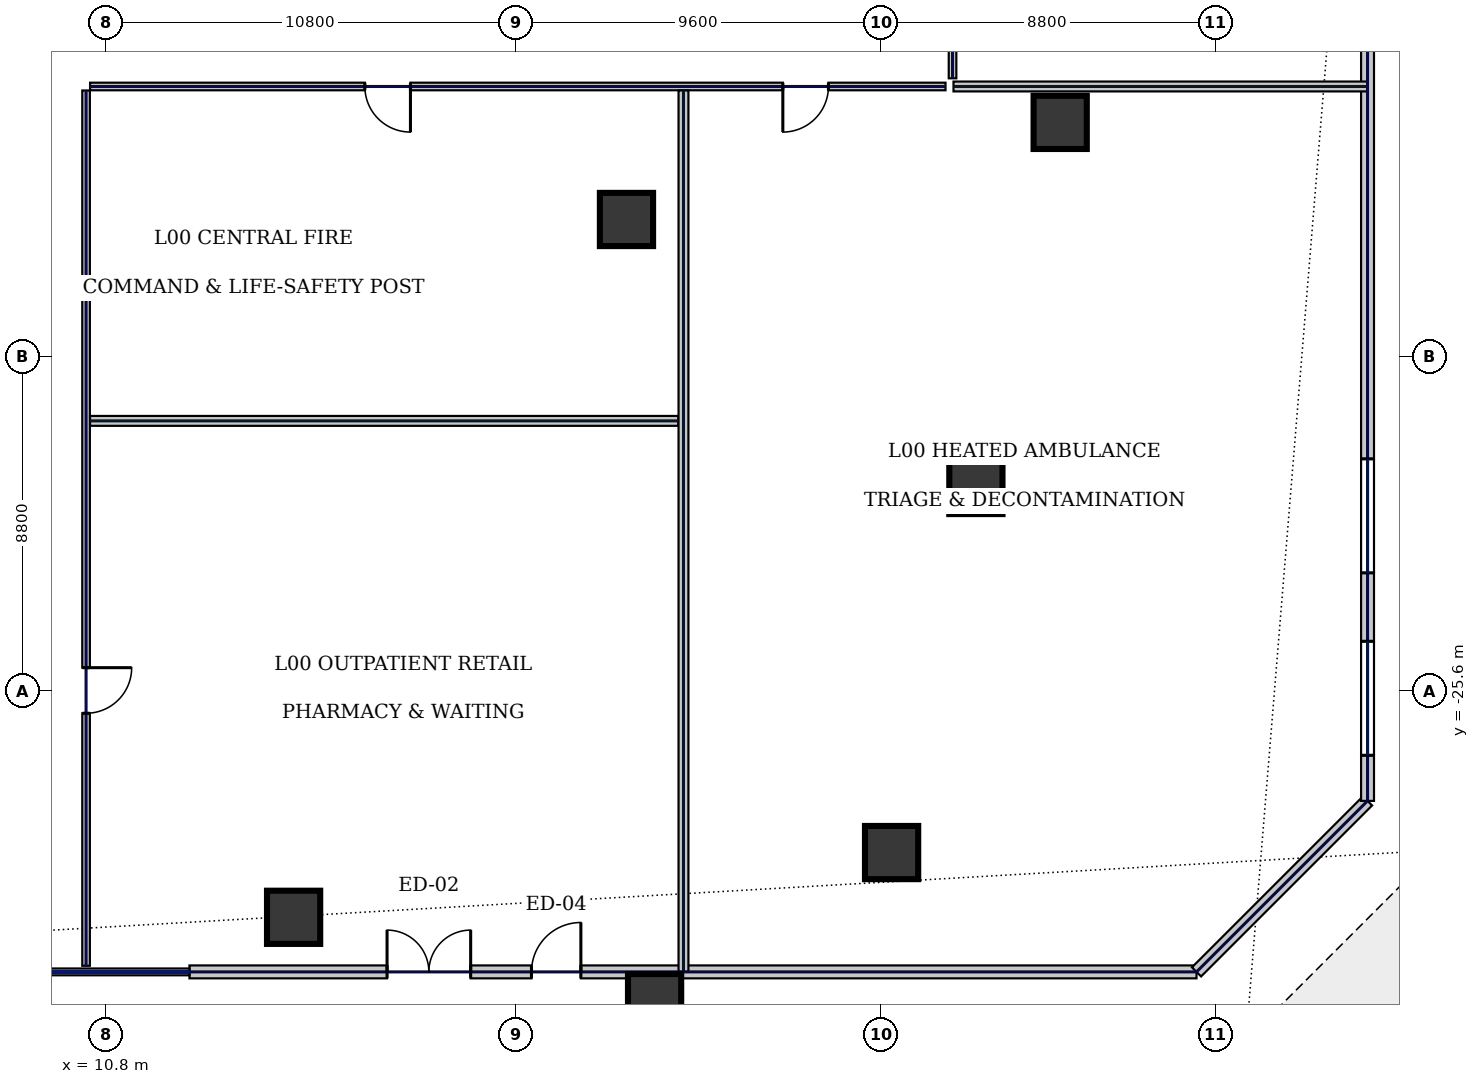
"""IFC4 building model, lengths in metres.
Left out: names, types, materials, properties, quantities, classifications, styles, units other than length and angle.
Written with IfcOpenShell. Run it as: python <this file> out.ifc"""

import sys

from ifc_helpers import new_model, si_unit, direction, frame, frame_2d, origin, origin_2d, place, context, subcontext, project, spatial, rectangle, hollow_circle, extrude, element, fill, save


model = new_model("IFC4")
c1 = context("Model", 3, precision=1e-05, world=origin(), true_north=direction((0.0, 1.0)))
c2 = subcontext(c1, "Body", "Model", "MODEL_VIEW")
j1 = project(units=[si_unit("LENGTHUNIT", "METRE"), si_unit("PLANEANGLEUNIT", "RADIAN")], contexts=[c1])
p1 = place(None, origin())
s1 = spatial("IfcSite", under=j1, at=p1, CompositionType="ELEMENT")
p2 = place(p1, origin())
s2 = spatial("IfcBuilding", under=s1, at=p2, CompositionType="ELEMENT")
p3 = place(p2, origin())
s3 = spatial("IfcBuildingStorey", under=s2, at=p3, CompositionType="ELEMENT", Elevation=0.0)
for number, where, z_axis, x_axis in (
    (1, (24.5, -13.2, 0.0), (0.0, 0.0, 1.0), (1.0, 0.0, 0.0)),
    (2, (15.741, -31.564, 0.0), (0.0, 0.0, 1.0), (1.0, 0.0, 0.0)),
    (3, (25.24, -33.757, 0.0), (0.0, 0.0, 1.0), (1.0, 0.0, 0.0)),
    (4, (31.476, -29.86, 0.0), (0.0, 0.0, 1.0), (1.0, 0.0, 0.0)),
    (5, (33.694, -20.252, 0.0), (0.0, 0.0, 1.0), (1.0, 0.0, 0.0)),
    (6, (35.912, -10.645, 0.0), (0.0, 0.0, 1.0), (1.0, 0.0, 0.0)),
):
    element("IfcColumn", number, at=place(p3, frame(where, z_axis=z_axis, x_axis=x_axis)), inside=s3, PredefinedType="COLUMN", context=c2, shape_type="SweptSolid", body=[
        extrude(hollow_circle(Radius=0.7, WallThickness=0.05, at=origin_2d()), origin(), (0.0, 0.0, 1.0), 8.1),
    ])
p4 = place(p3, frame((13.0, -33.0, 0.0), z_axis=(0.0, 0.0, 1.0), x_axis=(1.0, 0.0, 0.0)))
e7 = element("IfcWall", 7, at=p4, inside=s3, PredefinedType="STANDARD", context=c2, shape_type="SweptSolid", body=[
    extrude(rectangle(XDim=26.5, YDim=0.34, at=frame_2d((13.25, 0.0))), origin(), (0.0, 0.0, 1.0), 7.095),
])
p5 = place(p4, frame((5.2, 0.0, 0.0)))
e8 = element("IfcOpeningElement", 8, at=p5, cuts=e7, PredefinedType="OPENING", context=c2, shape_type="SweptSolid", body=[
    extrude(rectangle(XDim=2.2, YDim=2.5, at=frame_2d((1.1, 1.25))), frame((0.0, 0.18, 0.0), z_axis=(0.0, -1.0, 0.0), x_axis=(1.0, 0.0, 0.0)), (0.0, 0.0, 1.0), 0.36),
])
p6 = place(p4, frame((9.0, 0.0, 0.0)))
e9 = element("IfcOpeningElement", 9, at=p6, cuts=e7, PredefinedType="OPENING", context=c2, shape_type="SweptSolid", body=[
    extrude(rectangle(XDim=1.3, YDim=2.2, at=frame_2d((0.65, 1.1))), frame((0.0, 0.18, 0.0), z_axis=(0.0, -1.0, 0.0), x_axis=(1.0, 0.0, 0.0)), (0.0, 0.0, 1.0), 0.36),
])
p7 = place(p3, frame((39.5, -33.0, 0.0), z_axis=(0.0, 0.0, 1.0), x_axis=(0.707106781187, 0.707106781187, 0.0)))
e10 = element("IfcWall", 10, at=p7, inside=s3, PredefinedType="STANDARD", context=c2, shape_type="SweptSolid", body=[
    extrude(rectangle(XDim=6.364, YDim=0.34, at=frame_2d((3.182, 0.0))), origin(), (0.0, 0.0, 1.0), 8.1),
])
p8 = place(p3, frame((44.0, -28.5, 0.0), z_axis=(0.0, 0.0, 1.0), x_axis=(0.0, 1.0, 0.0)))
e11 = element("IfcWall", 11, at=p8, inside=s3, PredefinedType="STANDARD", context=c2, shape_type="SweptSolid", body=[
    extrude(rectangle(XDim=21.0, YDim=0.34, at=frame_2d((10.5, 0.0))), origin(), (0.0, 0.0, 1.0), 8.1),
])
p9 = place(p8, frame((1.2, 0.0, 1.2)))
e12 = element("IfcOpeningElement", 12, at=p9, cuts=e11, PredefinedType="OPENING", context=c2, shape_type="SweptSolid", body=[
    extrude(rectangle(XDim=3.0, YDim=1.8, at=frame_2d((1.5, 0.9))), frame((0.0, 0.18, 0.0), z_axis=(0.0, -1.0, 0.0), x_axis=(1.0, 0.0, 0.0)), (0.0, 0.0, 1.0), 0.36),
])
p10 = place(p8, frame((6.0, 0.0, 1.2)))
e13 = element("IfcOpeningElement", 13, at=p10, cuts=e11, PredefinedType="OPENING", context=c2, shape_type="SweptSolid", body=[
    extrude(rectangle(XDim=3.0, YDim=1.8, at=frame_2d((1.5, 0.9))), frame((0.0, 0.18, 0.0), z_axis=(0.0, -1.0, 0.0), x_axis=(1.0, 0.0, 0.0)), (0.0, 0.0, 1.0), 0.36),
])
p11 = place(p3, frame((33.08, 9.485, 0.0), z_axis=(0.0, 0.0, 1.0), x_axis=(0.0, -1.0, 0.0)))
e14 = element("IfcWall", 14, at=p11, inside=s3, PredefinedType="SOLIDWALL", context=c2, shape_type="SweptSolid", body=[
    extrude(rectangle(XDim=18.97, YDim=0.2, at=frame_2d((9.485, 0.0))), origin(), (0.0, 0.0, 1.0), 8.1),
])
p12 = place(p11, frame((9.02, 0.0, 0.0)))
e15 = element("IfcOpeningElement", 15, at=p12, cuts=e14, PredefinedType="OPENING", context=c2, shape_type="SweptSolid", body=[
    extrude(rectangle(XDim=1.2, YDim=2.2, at=frame_2d((0.6, 1.1))), frame((0.0, 0.11, 0.0), z_axis=(0.0, -1.0, 0.0), x_axis=(1.0, 0.0, 0.0)), (0.0, 0.0, 1.0), 0.22),
])
p13 = place(p3, frame((32.895, -9.7, 0.0), z_axis=(0.0, 0.0, 1.0), x_axis=(-1.0, 0.0, 0.0)))
e16 = element("IfcWall", 16, at=p13, inside=s3, PredefinedType="SOLIDWALL", context=c2, shape_type="SweptSolid", body=[
    extrude(rectangle(XDim=22.51, YDim=0.2, at=frame_2d((11.255, 0.0))), origin(), (0.0, 0.0, 1.0), 8.1),
])
p14 = place(p13, frame((14.079, 0.0, 0.0)))
e17 = element("IfcOpeningElement", 17, at=p14, cuts=e16, PredefinedType="OPENING", context=c2, shape_type="SweptSolid", body=[
    extrude(rectangle(XDim=1.2, YDim=2.2, at=frame_2d((0.6, 1.1))), frame((0.0, 0.11, 0.0), z_axis=(0.0, -1.0, 0.0), x_axis=(1.0, 0.0, 0.0)), (0.0, 0.0, 1.0), 0.22),
])
p15 = place(p13, frame((3.081, 0.0, 0.0)))
e18 = element("IfcOpeningElement", 18, at=p15, cuts=e16, PredefinedType="OPENING", context=c2, shape_type="SweptSolid", body=[
    extrude(rectangle(XDim=1.2, YDim=2.2, at=frame_2d((0.6, 1.1))), frame((0.0, 0.11, 0.0), z_axis=(0.0, -1.0, 0.0), x_axis=(1.0, 0.0, 0.0)), (0.0, 0.0, 1.0), 0.22),
])
p16 = place(p3, frame((10.28, -9.805, 0.0), z_axis=(0.0, 0.0, 1.0), x_axis=(0.0, -1.0, 0.0)))
e19 = element("IfcWall", 19, at=p16, inside=s3, PredefinedType="SOLIDWALL", context=c2, shape_type="SweptSolid", body=[
    extrude(rectangle(XDim=23.035, YDim=0.2, at=frame_2d((11.518, 0.0))), origin(), (0.0, 0.0, 1.0), 8.1),
])
p17 = place(p16, frame((15.189, 0.0, 0.0)))
e20 = element("IfcOpeningElement", 20, at=p17, cuts=e19, PredefinedType="OPENING", context=c2, shape_type="SweptSolid", body=[
    extrude(rectangle(XDim=1.2, YDim=2.2, at=frame_2d((0.6, 1.1))), frame((0.0, 0.11, 0.0), z_axis=(0.0, -1.0, 0.0), x_axis=(1.0, 0.0, 0.0)), (0.0, 0.0, 1.0), 0.22),
])
p18 = place(p3, frame((33.105, -9.7, 0.0), z_axis=(0.0, 0.0, 1.0), x_axis=(1.0, 0.0, 0.0)))
e21 = element("IfcWall", 21, at=p18, inside=s3, PredefinedType="SOLIDWALL", context=c2, shape_type="SweptSolid", body=[
    extrude(rectangle(XDim=10.895, YDim=0.26, at=frame_2d((5.448, 0.0))), origin(), (0.0, 0.0, 1.0), 8.1),
])
p19 = place(p3, frame((10.385, -18.5, 0.0), z_axis=(0.0, 0.0, 1.0), x_axis=(1.0, 0.0, 0.0)))
e22 = element("IfcWall", 22, at=p19, inside=s3, PredefinedType="SOLIDWALL", context=c2, shape_type="SweptSolid", body=[
    extrude(rectangle(XDim=15.48, YDim=0.26, at=frame_2d((7.74, 0.0))), origin(), (0.0, 0.0, 1.0), 8.1),
])
p20 = place(p3, frame((26.0, -33.0, 0.0), z_axis=(0.0, 0.0, 1.0), x_axis=(0.0, 1.0, 0.0)))
e23 = element("IfcWall", 23, at=p20, inside=s3, PredefinedType="SOLIDWALL", context=c2, shape_type="SweptSolid", body=[
    extrude(rectangle(XDim=23.195, YDim=0.26, at=frame_2d((11.598, 0.0))), origin(), (0.0, 0.0, 1.0), 8.1),
])
p21 = place(p5, origin())
e24 = element("IfcDoor", 24, at=p21, inside=s3, OperationType="DOUBLE_SWING_RIGHT", PredefinedType="DOOR", context=c2, shape_type="SweptSolid", body=[
    extrude(rectangle(XDim=2.2, YDim=2.5, at=frame_2d((1.1, 1.25))), frame((0.0, 0.025, 0.0), z_axis=(0.0, -1.0, 0.0), x_axis=(1.0, 0.0, 0.0)), (0.0, 0.0, 1.0), 0.05),
])
fill(e8, e24)
p22 = place(p6, origin())
e25 = element("IfcDoor", 25, at=p22, inside=s3, OperationType="SINGLE_SWING_RIGHT", PredefinedType="DOOR", context=c2, shape_type="SweptSolid", body=[
    extrude(rectangle(XDim=1.3, YDim=2.2, at=frame_2d((0.65, 1.1))), frame((0.0, 0.025, 0.0), z_axis=(0.0, -1.0, 0.0), x_axis=(1.0, 0.0, 0.0)), (0.0, 0.0, 1.0), 0.05),
])
fill(e9, e25)
p23 = place(p9, origin())
e26 = element("IfcWindow", 26, at=p23, inside=s3, PartitioningType="SINGLE_PANEL", PredefinedType="WINDOW", context=c2, shape_type="SweptSolid", body=[
    extrude(rectangle(XDim=3.0, YDim=1.8, at=frame_2d((1.5, 0.9))), frame((0.0, 0.03, 0.0), z_axis=(0.0, -1.0, 0.0), x_axis=(1.0, 0.0, 0.0)), (0.0, 0.0, 1.0), 0.06),
])
fill(e12, e26)
p24 = place(p10, origin())
e27 = element("IfcWindow", 27, at=p24, inside=s3, PartitioningType="SINGLE_PANEL", PredefinedType="WINDOW", context=c2, shape_type="SweptSolid", body=[
    extrude(rectangle(XDim=3.0, YDim=1.8, at=frame_2d((1.5, 0.9))), frame((0.0, 0.03, 0.0), z_axis=(0.0, -1.0, 0.0), x_axis=(1.0, 0.0, 0.0)), (0.0, 0.0, 1.0), 0.06),
])
fill(e13, e27)
p25 = place(p14, origin())
e28 = element("IfcDoor", 28, at=p25, inside=s3, OperationType="SINGLE_SWING_LEFT", PredefinedType="DOOR", context=c2, shape_type="SweptSolid", body=[
    extrude(rectangle(XDim=1.2, YDim=2.2, at=frame_2d((0.6, 1.1))), frame((0.0, 0.025, 0.0), z_axis=(0.0, -1.0, 0.0), x_axis=(1.0, 0.0, 0.0)), (0.0, 0.0, 1.0), 0.05),
])
fill(e17, e28)
p26 = place(p15, origin())
e29 = element("IfcDoor", 29, at=p26, inside=s3, OperationType="SINGLE_SWING_RIGHT", PredefinedType="DOOR", context=c2, shape_type="SweptSolid", body=[
    extrude(rectangle(XDim=1.2, YDim=2.2, at=frame_2d((0.6, 1.1))), frame((0.0, 0.025, 0.0), z_axis=(0.0, -1.0, 0.0), x_axis=(1.0, 0.0, 0.0)), (0.0, 0.0, 1.0), 0.05),
])
fill(e18, e29)
p27 = place(p17, origin())
e30 = element("IfcDoor", 30, at=p27, inside=s3, OperationType="SINGLE_SWING_LEFT", PredefinedType="DOOR", context=c2, shape_type="SweptSolid", body=[
    extrude(rectangle(XDim=1.2, YDim=2.2, at=frame_2d((0.6, 1.1))), frame((0.0, 0.025, 0.0), z_axis=(0.0, -1.0, 0.0), x_axis=(1.0, 0.0, 0.0)), (0.0, 0.0, 1.0), 0.05),
])
fill(e20, e30)
save(model, sys.argv[1])
